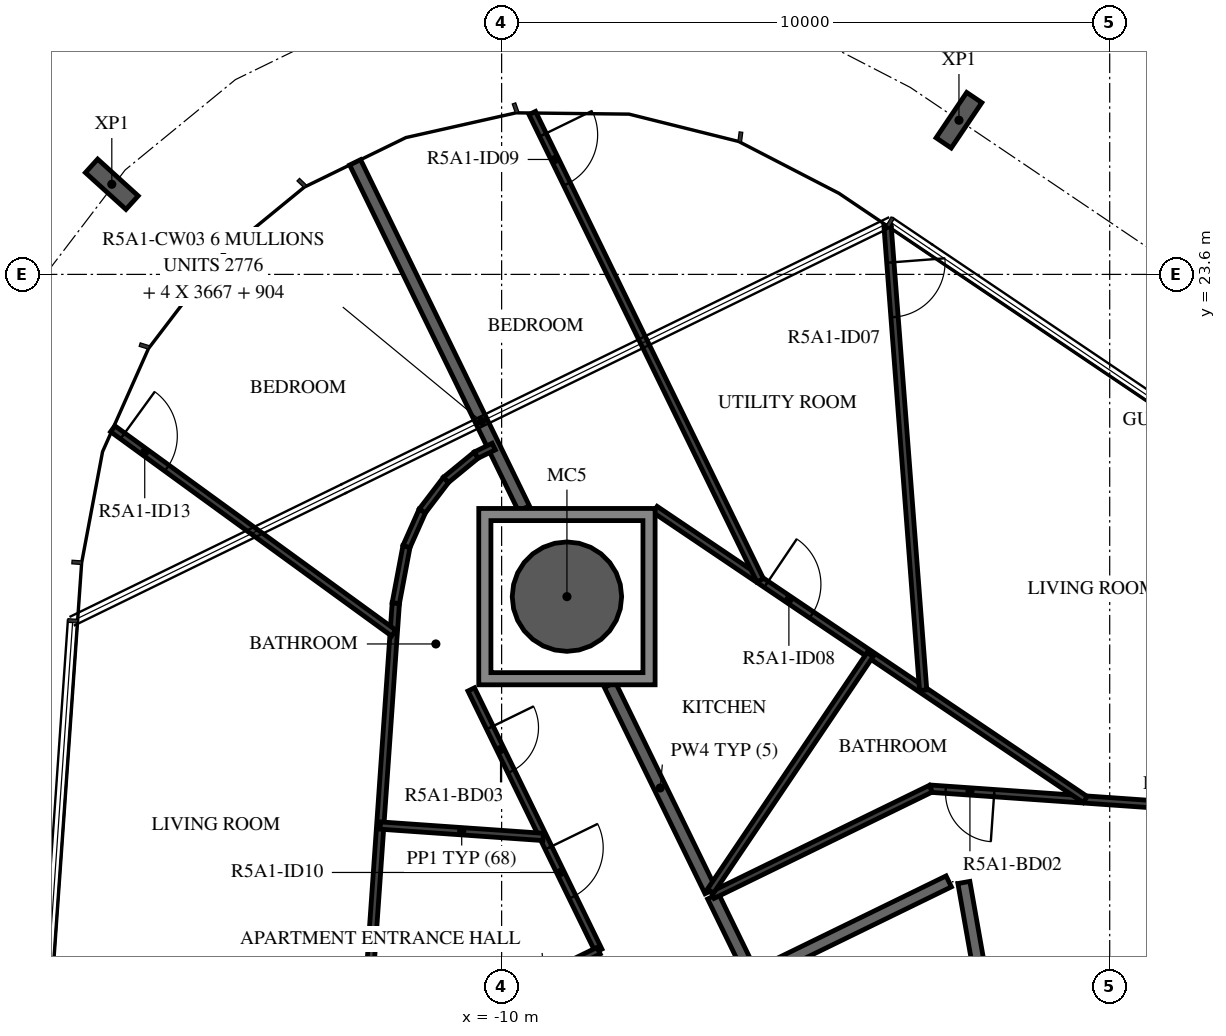
"""IFC4 building model, lengths in metres.
Left out: names, types, materials, properties, quantities, classifications, styles, units other than length and angle.
Written with IfcOpenShell. Run it as: python <this file> out.ifc"""

import sys

from ifc_helpers import new_model, si_unit, direction, frame, frame_2d, origin, origin_2d, place, context, subcontext, project, spatial, polyline, rectangle, hollow_circle, i_section, outline, extrude, element, fill, save


model = new_model("IFC4")
c1 = context("Model", 3, precision=1e-05, world=origin(), true_north=direction((0.0, 1.0)))
c2 = subcontext(c1, "Body", "Model", "MODEL_VIEW")
j1 = project(units=[si_unit("LENGTHUNIT", "METRE"), si_unit("PLANEANGLEUNIT", "RADIAN")], contexts=[c1])
p1 = place(None, origin())
s1 = spatial("IfcSite", under=j1, at=p1, CompositionType="ELEMENT")
p2 = place(p1, origin())
s2 = spatial("IfcBuilding", under=s1, at=p2, CompositionType="ELEMENT")
p3 = place(p2, frame((0.0, 0.0, 191.9)))
s3 = spatial("IfcBuildingStorey", under=s2, at=p3, CompositionType="ELEMENT", Elevation=191.9)
p4 = place(p3, frame((-8.926, 18.301, -0.38), z_axis=(0.0, 0.0, 1.0), x_axis=(1.0, 0.0, 0.0)))
e1 = element("IfcColumn", 1, at=p4, inside=s3, PredefinedType="COLUMN", context=c2, shape_type="SweptSolid", body=[
    extrude(hollow_circle(Radius=0.9, WallThickness=0.04, at=origin_2d()), origin(), (0.0, 0.0, 1.0), 3.5),
])
for number, where, z_axis, x_axis in (
    (2, (-2.479, 26.135, -0.38), (0.0, 0.0, 1.0), (0.829, -0.559, 0.0)),
    (3, (-16.411, 25.082, -0.38), (0.0, 0.0, 1.0), (0.671, 0.741, 0.0)),
):
    element("IfcColumn", number, at=place(p3, frame(where, z_axis=z_axis, x_axis=x_axis)), inside=s3, PredefinedType="COLUMN", context=c2, shape_type="SweptSolid", body=[
        extrude(i_section(OverallWidth=0.3, OverallDepth=0.9, WebThickness=0.019, FlangeThickness=0.035, FilletRadius=0.03, at=origin_2d()), origin(), (0.0, 0.0, 1.0), 3.5),
    ])
p5 = place(p3, frame((-2.074, 11.761, 0.0), z_axis=(0.0, 0.0, 1.0), x_axis=(-0.173740587112, 0.984791454263, 0.0)))
e4 = element("IfcWall", 4, at=p5, inside=s3, PredefinedType="STANDARD", context=c2, shape_type="SweptSolid", body=[
    extrude(rectangle(XDim=1.867, YDim=0.2, at=frame_2d((0.934, 0.0))), origin(), (0.0, 0.0, 1.0), 3.12),
])
p6 = place(p3, frame((-2.647, 13.618, 0.0), z_axis=(0.0, 0.0, 1.0), x_axis=(-0.898796543751, -0.438366026218, 0.0)))
e5 = element("IfcWall", 5, at=p6, inside=s3, PredefinedType="STANDARD", context=c2, shape_type="SweptSolid", body=[
    extrude(rectangle(XDim=7.181, YDim=0.2, at=frame_2d((3.591, 0.0))), origin(), (0.0, 0.0, 1.0), 3.12),
])
p7 = place(p3, frame((-6.522, 13.373, 0.0), z_axis=(0.0, 0.0, 1.0), x_axis=(0.438277270821, -0.8988398266, 0.0)))
e6 = element("IfcWall", 6, at=p7, inside=s3, PredefinedType="STANDARD", context=c2, shape_type="SweptSolid", body=[
    extrude(rectangle(XDim=1.479, YDim=0.2, at=frame_2d((0.74, 0.0))), origin(), (0.0, 0.0, 1.0), 3.12),
])
p8 = place(p3, frame((-8.219, 16.851, 0.0), z_axis=(0.0, 0.0, 1.0), x_axis=(0.438291091101, -0.898833087654, 0.0)))
e7 = element("IfcWall", 7, at=p8, inside=s3, PredefinedType="STANDARD", context=c2, shape_type="SweptSolid", body=[
    extrude(rectangle(XDim=3.774, YDim=0.2, at=frame_2d((1.887, 0.0))), origin(), (0.0, 0.0, 1.0), 3.12),
])
p9 = place(p3, frame((-12.409, 25.442, 0.0), z_axis=(0.0, 0.0, 1.0), x_axis=(0.43838641251, -0.898786600549, 0.0)))
e8 = element("IfcWall", 8, at=p9, inside=s3, PredefinedType="STANDARD", context=c2, shape_type="SweptSolid", body=[
    extrude(rectangle(XDim=6.333, YDim=0.2, at=frame_2d((3.166, 0.0))), origin(), (0.0, 0.0, 1.0), 3.12),
])
p10 = place(p3, frame((5.022, 14.585, 0.0), z_axis=(0.0, 0.0, 1.0), x_axis=(-0.997565118395, 0.069741197017, 0.0)))
e9 = element("IfcWall", 9, at=p10, inside=s3, PredefinedType="PARTITIONING", context=c2, shape_type="SweptSolid", body=[
    extrude(rectangle(XDim=7.985, YDim=0.12, at=frame_2d((3.993, 0.0))), origin(), (0.0, 0.0, 1.0), 3.12),
])
p11 = place(p10, frame((2.875, 0.0, 0.0)))
e10 = element("IfcOpeningElement", 10, at=p11, cuts=e9, PredefinedType="OPENING", context=c2, shape_type="SweptSolid", body=[
    extrude(rectangle(XDim=0.9, YDim=2.1, at=frame_2d((0.45, 1.05))), frame((0.0, 0.07, 0.0), z_axis=(0.0, -1.0, 0.0), x_axis=(1.0, 0.0, 0.0)), (0.0, 0.0, 1.0), 0.14),
])
p12 = place(p10, frame((6.938, 0.0, 0.0)))
e11 = element("IfcOpeningElement", 11, at=p12, cuts=e9, PredefinedType="OPENING", context=c2, shape_type="SweptSolid", body=[
    extrude(rectangle(XDim=0.8, YDim=2.1, at=frame_2d((0.4, 1.05))), frame((0.0, 0.07, 0.0), z_axis=(0.0, -1.0, 0.0), x_axis=(1.0, 0.0, 0.0)), (0.0, 0.0, 1.0), 0.14),
])
p13 = place(p3, frame((-2.943, 15.142, 0.0), z_axis=(0.0, 0.0, 1.0), x_axis=(-0.89881075705, -0.438336883014, 0.0)))
e12 = element("IfcWall", 12, at=p13, inside=s3, PredefinedType="PARTITIONING", context=c2, shape_type="SweptSolid", body=[
    extrude(rectangle(XDim=3.992, YDim=0.12, at=frame_2d((1.996, 0.0))), origin(), (0.0, 0.0, 1.0), 3.12),
])
p14 = place(p3, frame((-7.476, 19.735, 0.0), z_axis=(0.0, 0.0, 1.0), x_axis=(0.829035412992, -0.559196105142, 0.0)))
e13 = element("IfcWall", 13, at=p14, inside=s3, PredefinedType="PARTITIONING", context=c2, shape_type="SweptSolid", body=[
    extrude(rectangle(XDim=8.531, YDim=0.12, at=frame_2d((4.266, 0.0))), origin(), (0.0, 0.0, 1.0), 3.12),
])
p15 = place(p14, frame((2.204, 0.0, 0.0)))
e14 = element("IfcOpeningElement", 14, at=p15, cuts=e13, PredefinedType="OPENING", context=c2, shape_type="SweptSolid", body=[
    extrude(rectangle(XDim=0.9, YDim=2.1, at=frame_2d((0.45, 1.05))), frame((0.0, 0.07, 0.0), z_axis=(0.0, -1.0, 0.0), x_axis=(1.0, 0.0, 0.0)), (0.0, 0.0, 1.0), 0.14),
])
p16 = place(p3, frame((-3.653, 24.394, 0.0), z_axis=(0.0, 0.0, 1.0), x_axis=(0.076513576433, -0.997068539581, 0.0)))
e15 = element("IfcWall", 15, at=p16, inside=s3, PredefinedType="PARTITIONING", context=c2, shape_type="SweptSolid", body=[
    extrude(rectangle(XDim=7.655, YDim=0.12, at=frame_2d((3.827, 0.0))), origin(), (0.0, 0.0, 1.0), 3.12),
])
p17 = place(p16, frame((0.6, 0.0, 0.0)))
e16 = element("IfcOpeningElement", 16, at=p17, cuts=e15, PredefinedType="OPENING", context=c2, shape_type="SweptSolid", body=[
    extrude(rectangle(XDim=0.9, YDim=2.1, at=frame_2d((0.45, 1.05))), frame((0.0, 0.07, 0.0), z_axis=(0.0, -1.0, 0.0), x_axis=(1.0, 0.0, 0.0)), (0.0, 0.0, 1.0), 0.14),
])
p18 = place(p3, frame((-3.939, 17.35, 0.0), z_axis=(0.0, 0.0, 1.0), x_axis=(-0.559193216274, -0.829037361566, 0.0)))
e17 = element("IfcWall", 17, at=p18, inside=s3, PredefinedType="PARTITIONING", context=c2, shape_type="SweptSolid", body=[
    extrude(rectangle(XDim=4.694, YDim=0.12, at=frame_2d((2.347, 0.0))), origin(), (0.0, 0.0, 1.0), 3.12),
])
p19 = place(p3, frame((-9.496, 26.254, 0.0), z_axis=(0.0, 0.0, 1.0), x_axis=(0.438361739807, -0.89879863433, 0.0)))
e18 = element("IfcWall", 18, at=p19, inside=s3, PredefinedType="PARTITIONING", context=c2, shape_type="SweptSolid", body=[
    extrude(rectangle(XDim=8.549, YDim=0.12, at=frame_2d((4.274, 0.0))), origin(), (0.0, 0.0, 1.0), 3.12),
])
p20 = place(p19, frame((0.4, 0.0, 0.0)))
e19 = element("IfcOpeningElement", 19, at=p20, cuts=e18, PredefinedType="OPENING", context=c2, shape_type="SweptSolid", body=[
    extrude(rectangle(XDim=0.9, YDim=2.1, at=frame_2d((0.45, 1.05))), frame((0.0, 0.07, 0.0), z_axis=(0.0, -1.0, 0.0), x_axis=(1.0, 0.0, 0.0)), (0.0, 0.0, 1.0), 0.14),
])
p21 = place(p3, frame((-10.5, 16.775, 0.0), z_axis=(0.0, 0.0, 1.0), x_axis=(0.438345136783, -0.898806731761, 0.0)))
e20 = element("IfcWall", 20, at=p21, inside=s3, PredefinedType="PARTITIONING", context=c2, shape_type="SweptSolid", body=[
    extrude(rectangle(XDim=4.78, YDim=0.12, at=frame_2d((2.39, 0.0))), origin(), (0.0, 0.0, 1.0), 3.12),
])
p22 = place(p21, frame((0.7, 0.0, 0.0)))
e21 = element("IfcOpeningElement", 21, at=p22, cuts=e20, PredefinedType="OPENING", context=c2, shape_type="SweptSolid", body=[
    extrude(rectangle(XDim=0.8, YDim=2.1, at=frame_2d((0.4, 1.05))), frame((0.0, 0.07, 0.0), z_axis=(0.0, -1.0, 0.0), x_axis=(1.0, 0.0, 0.0)), (0.0, 0.0, 1.0), 0.14),
])
p23 = place(p21, frame((2.899, 0.0, 0.0)))
e22 = element("IfcOpeningElement", 22, at=p23, cuts=e20, PredefinedType="OPENING", context=c2, shape_type="SweptSolid", body=[
    extrude(rectangle(XDim=0.9, YDim=2.1, at=frame_2d((0.45, 1.05))), frame((0.0, 0.07, 0.0), z_axis=(0.0, -1.0, 0.0), x_axis=(1.0, 0.0, 0.0)), (0.0, 0.0, 1.0), 0.14),
])
p24 = place(p3, frame((-8.405, 12.479, 0.0), z_axis=(0.0, 0.0, 1.0), x_axis=(-0.898784427692, -0.438390867307, 0.0)))
e23 = element("IfcWall", 23, at=p24, inside=s3, PredefinedType="PARTITIONING", context=c2, shape_type="SweptSolid", body=[
    extrude(rectangle(XDim=1.908, YDim=0.12, at=frame_2d((0.954, 0.0))), origin(), (0.0, 0.0, 1.0), 3.12),
])
p25 = place(p3, frame((-12.439, 8.204, 0.0), z_axis=(0.0, 0.0, 1.0), x_axis=(0.069750037523, 0.997564500303, 0.0)))
e24 = element("IfcWall", 24, at=p25, inside=s3, PredefinedType="PARTITIONING", context=c2, shape_type="SweptSolid", body=[
    extrude(rectangle(XDim=10.014, YDim=0.12, at=frame_2d((5.007, 0.0))), origin(), (0.0, 0.0, 1.0), 3.12),
])
p26 = place(p25, frame((1.859, 0.0, 0.0)))
e25 = element("IfcOpeningElement", 25, at=p26, cuts=e24, PredefinedType="OPENING", context=c2, shape_type="SweptSolid", body=[
    extrude(rectangle(XDim=0.9, YDim=2.1, at=frame_2d((0.45, 1.05))), frame((0.0, 0.07, 0.0), z_axis=(0.0, -1.0, 0.0), x_axis=(1.0, 0.0, 0.0)), (0.0, 0.0, 1.0), 0.14),
])
p27 = place(p3, frame((-11.74, 18.194, 0.0), z_axis=(0.0, 0.0, 1.0), x_axis=(0.185144760846, 0.982711258474, 0.0)))
e26 = element("IfcWall", 26, at=p27, inside=s3, PredefinedType="PARTITIONING", context=c2, shape_type="SweptSolid", body=[
    extrude(rectangle(XDim=0.947, YDim=0.12, at=frame_2d((0.473, 0.0))), origin(), (0.0, 0.0, 1.0), 3.12),
])
for number, where, z_axis, x_axis in (
    (27, (-11.565, 19.125, 0.0), (0.0, 0.0, 1.0), (0.407, 0.914, 0.0)),
    (28, (-11.304, 19.711, 0.0), (0.0, 0.0, 1.0), (0.607, 0.795, 0.0)),
    (29, (-10.915, 20.221, 0.0), (0.0, 0.0, 1.0), (0.773, 0.634, 0.0)),
):
    element("IfcWall", number, at=place(p3, frame(where, z_axis=z_axis, x_axis=x_axis)), inside=s3, PredefinedType="PARTITIONING", context=c2, shape_type="SweptSolid", body=[
        extrude(rectangle(XDim=0.642, YDim=0.12, at=frame_2d((0.321, 0.0))), origin(), (0.0, 0.0, 1.0), 3.12),
    ])
p28 = place(p3, frame((-10.418, 20.628, 0.0), z_axis=(0.0, 0.0, 1.0), x_axis=(0.898943795765, 0.438063981692, 0.0)))
e30 = element("IfcWall", 30, at=p28, inside=s3, PredefinedType="PARTITIONING", context=c2, shape_type="SweptSolid", body=[
    extrude(rectangle(XDim=0.321, YDim=0.12, at=frame_2d((0.161, 0.0))), origin(), (0.0, 0.0, 1.0), 3.12),
])
p29 = place(p3, frame((-16.395, 21.061, 0.0), z_axis=(0.0, 0.0, 1.0), x_axis=(0.808810002497, -0.58807004673, 0.0)))
e31 = element("IfcWall", 31, at=p29, inside=s3, PredefinedType="PARTITIONING", context=c2, shape_type="SweptSolid", body=[
    extrude(rectangle(XDim=5.713, YDim=0.12, at=frame_2d((2.856, 0.0))), origin(), (0.0, 0.0, 1.0), 3.12),
])
p30 = place(p29, frame((0.2, 0.0, 0.0)))
e32 = element("IfcOpeningElement", 32, at=p30, cuts=e31, PredefinedType="OPENING", context=c2, shape_type="SweptSolid", body=[
    extrude(rectangle(XDim=0.9, YDim=2.1, at=frame_2d((0.45, 1.05))), frame((0.0, 0.07, 0.0), z_axis=(0.0, -1.0, 0.0), x_axis=(1.0, 0.0, 0.0)), (0.0, 0.0, 1.0), 0.14),
])
p31 = place(p3, frame((-11.996, 14.536, 0.0), z_axis=(0.0, 0.0, 1.0), x_axis=(0.997565991425, -0.069728708231, 0.0)))
e33 = element("IfcWall", 33, at=p31, inside=s3, PredefinedType="PARTITIONING", context=c2, shape_type="SweptSolid", body=[
    extrude(rectangle(XDim=2.686, YDim=0.12, at=frame_2d((1.343, 0.0))), origin(), (0.0, 0.0, 1.0), 3.12),
])
p32 = place(p3, origin())
e34 = element("IfcWall", 34, at=p32, inside=s3, PredefinedType="STANDARD", context=c2, shape_type="SweptSolid", body=[
    extrude(outline(polyline([(-7.476, 19.751), (-7.476, 16.851), (-10.376, 16.851), (-10.376, 19.751), (-7.476, 19.751)]), holes=[polyline([(-10.176, 17.051), (-7.676, 17.051), (-7.676, 19.551), (-10.176, 19.551), (-10.176, 17.051)])]), origin(), (0.0, 0.0, 1.0), 3.12),
])
p33 = place(p12, origin())
e35 = element("IfcDoor", 35, at=p33, inside=s3, OperationType="SINGLE_SWING_RIGHT", PredefinedType="DOOR", context=c2, shape_type="SweptSolid", body=[
    extrude(rectangle(XDim=0.8, YDim=2.1, at=frame_2d((0.4, 1.05))), frame((0.0, 0.025, 0.0), z_axis=(0.0, -1.0, 0.0), x_axis=(1.0, 0.0, 0.0)), (0.0, 0.0, 1.0), 0.05),
])
fill(e11, e35)
p34 = place(p17, origin())
e36 = element("IfcDoor", 36, at=p34, inside=s3, OperationType="SINGLE_SWING_RIGHT", PredefinedType="DOOR", context=c2, shape_type="SweptSolid", body=[
    extrude(rectangle(XDim=0.9, YDim=2.1, at=frame_2d((0.45, 1.05))), frame((0.0, 0.025, 0.0), z_axis=(0.0, -1.0, 0.0), x_axis=(1.0, 0.0, 0.0)), (0.0, 0.0, 1.0), 0.05),
])
fill(e16, e36)
p35 = place(p15, origin())
e37 = element("IfcDoor", 37, at=p35, inside=s3, OperationType="SINGLE_SWING_LEFT", PredefinedType="DOOR", context=c2, shape_type="SweptSolid", body=[
    extrude(rectangle(XDim=0.9, YDim=2.1, at=frame_2d((0.45, 1.05))), frame((0.0, 0.025, 0.0), z_axis=(0.0, -1.0, 0.0), x_axis=(1.0, 0.0, 0.0)), (0.0, 0.0, 1.0), 0.05),
])
fill(e14, e37)
p36 = place(p20, origin())
e38 = element("IfcDoor", 38, at=p36, inside=s3, OperationType="SINGLE_SWING_RIGHT", PredefinedType="DOOR", context=c2, shape_type="SweptSolid", body=[
    extrude(rectangle(XDim=0.9, YDim=2.1, at=frame_2d((0.45, 1.05))), frame((0.0, 0.025, 0.0), z_axis=(0.0, -1.0, 0.0), x_axis=(1.0, 0.0, 0.0)), (0.0, 0.0, 1.0), 0.05),
])
fill(e19, e38)
p37 = place(p22, origin())
e39 = element("IfcDoor", 39, at=p37, inside=s3, OperationType="SINGLE_SWING_LEFT", PredefinedType="DOOR", context=c2, shape_type="SweptSolid", body=[
    extrude(rectangle(XDim=0.8, YDim=2.1, at=frame_2d((0.4, 1.05))), frame((0.0, 0.025, 0.0), z_axis=(0.0, -1.0, 0.0), x_axis=(1.0, 0.0, 0.0)), (0.0, 0.0, 1.0), 0.05),
])
fill(e21, e39)
p38 = place(p23, origin())
e40 = element("IfcDoor", 40, at=p38, inside=s3, OperationType="SINGLE_SWING_LEFT", PredefinedType="DOOR", context=c2, shape_type="SweptSolid", body=[
    extrude(rectangle(XDim=0.9, YDim=2.1, at=frame_2d((0.45, 1.05))), frame((0.0, 0.025, 0.0), z_axis=(0.0, -1.0, 0.0), x_axis=(1.0, 0.0, 0.0)), (0.0, 0.0, 1.0), 0.05),
])
fill(e22, e40)
p39 = place(p30, origin())
e41 = element("IfcDoor", 41, at=p39, inside=s3, OperationType="SINGLE_SWING_LEFT", PredefinedType="DOOR", context=c2, shape_type="SweptSolid", body=[
    extrude(rectangle(XDim=0.9, YDim=2.1, at=frame_2d((0.45, 1.05))), frame((0.0, 0.025, 0.0), z_axis=(0.0, -1.0, 0.0), x_axis=(1.0, 0.0, 0.0)), (0.0, 0.0, 1.0), 0.05),
])
fill(e32, e41)
save(model, sys.argv[1])
